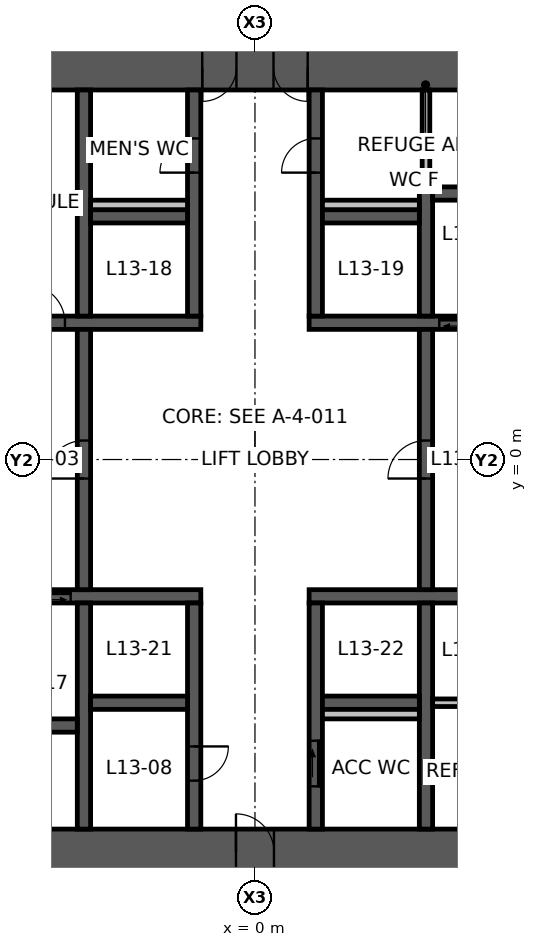
"""IFC4 building model, lengths in metres.
Left out: names, types, materials, properties, quantities, classifications, styles, units other than length and angle.
Written with IfcOpenShell. Run it as: python <this file> out.ifc"""

import sys

from ifc_helpers import new_model, si_unit, direction, frame, frame_2d, origin, place, context, subcontext, project, spatial, polyline, rectangle, outline, extrude, element, fill, save


model = new_model("IFC4")
c1 = context("Model", 3, precision=1e-05, world=origin(), true_north=direction((0.0, 1.0)))
c2 = subcontext(c1, "Body", "Model", "MODEL_VIEW")
j1 = project(units=[si_unit("LENGTHUNIT", "METRE"), si_unit("PLANEANGLEUNIT", "RADIAN")], contexts=[c1])
p1 = place(None, origin())
s1 = spatial("IfcSite", under=j1, at=p1, CompositionType="ELEMENT")
p2 = place(p1, origin())
s2 = spatial("IfcBuilding", under=s1, at=p2, CompositionType="ELEMENT")
p3 = place(p2, frame((0.0, 0.0, 52.0)))
s3 = spatial("IfcBuildingStorey", under=s2, at=p3, CompositionType="ELEMENT", Elevation=52.0)
p4 = place(p3, frame((5.961, 10.325, 0.0), z_axis=(0.0, 0.0, 1.0), x_axis=(-1.0, 0.0, 0.0)))
e1 = element("IfcWall", 1, at=p4, inside=s3, PredefinedType="SHEAR", context=c2, shape_type="SweptSolid", body=[
    extrude(outline(polyline([(-0.346, -0.6), (4.574, -0.6), (5.474, -0.6), (6.449, -0.6), (7.349, -0.6), (12.269, -0.6), (11.576, 0.6), (7.349, 0.6), (6.449, 0.6), (5.474, 0.6), (4.574, 0.6), (0.346, 0.6), (-0.346, -0.6)])), origin(), (0.0, 0.0, 1.0), 5.0),
])
p5 = place(p4, frame((6.449, 0.0, 0.0)))
e2 = element("IfcOpeningElement", 2, at=p5, cuts=e1, PredefinedType="OPENING", context=c2, shape_type="SweptSolid", body=[
    extrude(rectangle(XDim=0.9, YDim=2.1, at=frame_2d((0.45, 1.05))), frame((0.0, 0.61, 0.0), z_axis=(0.0, -1.0, 0.0), x_axis=(1.0, 0.0, 0.0)), (0.0, 0.0, 1.0), 1.22),
])
p6 = place(p4, frame((4.574, 0.0, 0.0)))
e3 = element("IfcOpeningElement", 3, at=p6, cuts=e1, PredefinedType="OPENING", context=c2, shape_type="SweptSolid", body=[
    extrude(rectangle(XDim=0.9, YDim=2.1, at=frame_2d((0.45, 1.05))), frame((0.0, 0.61, 0.0), z_axis=(0.0, -1.0, 0.0), x_axis=(1.0, 0.0, 0.0)), (0.0, 0.0, 1.0), 1.22),
])
p7 = place(p3, frame((-5.961, -10.325, 0.0), z_axis=(0.0, 0.0, 1.0), x_axis=(1.0, 0.0, 0.0)))
e4 = element("IfcWall", 4, at=p7, inside=s3, PredefinedType="SHEAR", context=c2, shape_type="SweptSolid", body=[
    extrude(outline(polyline([(-0.346, -0.6), (5.461, -0.6), (6.461, -0.6), (12.269, -0.6), (11.576, 0.6), (6.461, 0.6), (5.461, 0.6), (0.346, 0.6), (-0.346, -0.6)])), origin(), (0.0, 0.0, 1.0), 5.0),
])
p8 = place(p7, frame((5.461, 0.0, 0.0)))
e5 = element("IfcOpeningElement", 5, at=p8, cuts=e4, PredefinedType="OPENING", context=c2, shape_type="SweptSolid", body=[
    extrude(rectangle(XDim=1.0, YDim=2.1, at=frame_2d((0.5, 1.05))), frame((0.0, 0.61, 0.0), z_axis=(0.0, -1.0, 0.0), x_axis=(1.0, 0.0, 0.0)), (0.0, 0.0, 1.0), 1.22),
])
p9 = place(p3, frame((-9.151, 3.6, 0.0), z_axis=(0.0, 0.0, 1.0), x_axis=(1.0, 0.0, 0.0)))
e6 = element("IfcWall", 6, at=p9, inside=s3, PredefinedType="SHEAR", context=c2, shape_type="SweptSolid", body=[
    extrude(outline(polyline([(-0.101, -0.175), (3.151, -0.175), (4.151, -0.175), (7.726, -0.175), (7.726, 0.175), (4.151, 0.175), (3.151, 0.175), (0.101, 0.175), (-0.101, -0.175)])), origin(), (0.0, 0.0, 1.0), 5.0),
])
p10 = place(p9, frame((3.151, 0.0, 0.0)))
e7 = element("IfcOpeningElement", 7, at=p10, cuts=e6, PredefinedType="OPENING", context=c2, shape_type="SweptSolid", body=[
    extrude(rectangle(XDim=1.0, YDim=2.1, at=frame_2d((0.5, 1.05))), frame((0.0, 0.185, 0.0), z_axis=(0.0, -1.0, 0.0), x_axis=(1.0, 0.0, 0.0)), (0.0, 0.0, 1.0), 0.37),
])
p11 = place(p3, frame((1.425, 3.6, 0.0), z_axis=(0.0, 0.0, 1.0), x_axis=(1.0, 0.0, 0.0)))
e8 = element("IfcWall", 8, at=p11, inside=s3, PredefinedType="SHEAR", context=c2, shape_type="SweptSolid", body=[
    extrude(outline(polyline([(0.0, -0.175), (3.425, -0.175), (4.725, -0.175), (7.827, -0.175), (7.625, 0.175), (4.725, 0.175), (3.425, 0.175), (0.0, 0.175), (0.0, -0.175)])), origin(), (0.0, 0.0, 1.0), 5.0),
])
p12 = place(p11, frame((3.425, 0.0, 0.0)))
e9 = element("IfcOpeningElement", 9, at=p12, cuts=e8, PredefinedType="OPENING", context=c2, shape_type="SweptSolid", body=[
    extrude(rectangle(XDim=1.3, YDim=2.1, at=frame_2d((0.65, 1.05))), frame((0.0, 0.185, 0.0), z_axis=(0.0, -1.0, 0.0), x_axis=(1.0, 0.0, 0.0)), (0.0, 0.0, 1.0), 0.37),
])
p13 = place(p3, frame((-9.151, -3.6, 0.0), z_axis=(0.0, 0.0, 1.0), x_axis=(1.0, 0.0, 0.0)))
e10 = element("IfcWall", 10, at=p13, inside=s3, PredefinedType="SHEAR", context=c2, shape_type="SweptSolid", body=[
    extrude(outline(polyline([(0.101, -0.175), (3.001, -0.175), (4.301, -0.175), (7.726, -0.175), (7.726, 0.175), (4.301, 0.175), (3.001, 0.175), (-0.101, 0.175), (0.101, -0.175)])), origin(), (0.0, 0.0, 1.0), 5.0),
])
p14 = place(p13, frame((3.001, 0.0, 0.0)))
e11 = element("IfcOpeningElement", 11, at=p14, cuts=e10, PredefinedType="OPENING", context=c2, shape_type="SweptSolid", body=[
    extrude(rectangle(XDim=1.3, YDim=2.1, at=frame_2d((0.65, 1.05))), frame((0.0, 0.185, 0.0), z_axis=(0.0, -1.0, 0.0), x_axis=(1.0, 0.0, 0.0)), (0.0, 0.0, 1.0), 0.37),
])
p15 = place(p3, frame((1.425, -3.6, 0.0), z_axis=(0.0, 0.0, 1.0), x_axis=(1.0, 0.0, 0.0)))
e12 = element("IfcWall", 12, at=p15, inside=s3, PredefinedType="SHEAR", context=c2, shape_type="SweptSolid", body=[
    extrude(outline(polyline([(0.0, -0.175), (7.625, -0.175), (7.827, 0.175), (0.0, 0.175), (0.0, -0.175)])), origin(), (0.0, 0.0, 1.0), 5.0),
])
p16 = place(p3, frame((-1.6, 3.775, 0.0), z_axis=(0.0, 0.0, 1.0), x_axis=(0.0, 1.0, 0.0)))
e13 = element("IfcWall", 13, at=p16, inside=s3, PredefinedType="SHEAR", context=c2, shape_type="SweptSolid", body=[
    extrude(rectangle(XDim=5.95, YDim=0.35, at=frame_2d((2.975, 0.0))), origin(), (0.0, 0.0, 1.0), 5.0),
])
p17 = place(p16, frame((3.775, 0.0, 0.0)))
e14 = element("IfcOpeningElement", 14, at=p17, cuts=e13, PredefinedType="OPENING", context=c2, shape_type="SweptSolid", body=[
    extrude(rectangle(XDim=0.9, YDim=2.1, at=frame_2d((0.45, 1.05))), frame((0.0, 0.185, 0.0), z_axis=(0.0, -1.0, 0.0), x_axis=(1.0, 0.0, 0.0)), (0.0, 0.0, 1.0), 0.37),
])
p18 = place(p3, frame((1.6, 3.775, 0.0), z_axis=(0.0, 0.0, 1.0), x_axis=(0.0, 1.0, 0.0)))
e15 = element("IfcWall", 15, at=p18, inside=s3, PredefinedType="SHEAR", context=c2, shape_type="SweptSolid", body=[
    extrude(rectangle(XDim=5.95, YDim=0.35, at=frame_2d((2.975, 0.0))), origin(), (0.0, 0.0, 1.0), 5.0),
])
p19 = place(p18, frame((3.775, 0.0, 0.0)))
e16 = element("IfcOpeningElement", 16, at=p19, cuts=e15, PredefinedType="OPENING", context=c2, shape_type="SweptSolid", body=[
    extrude(rectangle(XDim=0.9, YDim=2.1, at=frame_2d((0.45, 1.05))), frame((0.0, 0.185, 0.0), z_axis=(0.0, -1.0, 0.0), x_axis=(1.0, 0.0, 0.0)), (0.0, 0.0, 1.0), 0.37),
])
p20 = place(p3, frame((-1.6, -3.775, 0.0), z_axis=(0.0, 0.0, 1.0), x_axis=(0.0, -1.0, 0.0)))
e17 = element("IfcWall", 17, at=p20, inside=s3, PredefinedType="SHEAR", context=c2, shape_type="SweptSolid", body=[
    extrude(rectangle(XDim=5.95, YDim=0.35, at=frame_2d((2.975, 0.0))), origin(), (0.0, 0.0, 1.0), 5.0),
])
p21 = place(p20, frame((3.775, 0.0, 0.0)))
e18 = element("IfcOpeningElement", 18, at=p21, cuts=e17, PredefinedType="OPENING", context=c2, shape_type="SweptSolid", body=[
    extrude(rectangle(XDim=0.9, YDim=2.1, at=frame_2d((0.45, 1.05))), frame((0.0, 0.185, 0.0), z_axis=(0.0, -1.0, 0.0), x_axis=(1.0, 0.0, 0.0)), (0.0, 0.0, 1.0), 0.37),
])
p22 = place(p3, frame((1.6, -3.775, 0.0), z_axis=(0.0, 0.0, 1.0), x_axis=(0.0, -1.0, 0.0)))
e19 = element("IfcWall", 19, at=p22, inside=s3, PredefinedType="SHEAR", context=c2, shape_type="SweptSolid", body=[
    extrude(rectangle(XDim=5.95, YDim=0.35, at=frame_2d((2.975, 0.0))), origin(), (0.0, 0.0, 1.0), 5.0),
])
p23 = place(p22, frame((3.625, 0.0, 0.0)))
e20 = element("IfcOpeningElement", 20, at=p23, cuts=e19, PredefinedType="OPENING", context=c2, shape_type="SweptSolid", body=[
    extrude(rectangle(XDim=1.2, YDim=2.1, at=frame_2d((0.6, 1.05))), frame((0.0, 0.185, 0.0), z_axis=(0.0, -1.0, 0.0), x_axis=(1.0, 0.0, 0.0)), (0.0, 0.0, 1.0), 0.37),
])
p24 = place(p3, frame((-4.5, -3.425, 0.0), z_axis=(0.0, 0.0, 1.0), x_axis=(0.0, 1.0, 0.0)))
e21 = element("IfcWall", 21, at=p24, inside=s3, PredefinedType="SHEAR", context=c2, shape_type="SweptSolid", body=[
    extrude(rectangle(XDim=6.85, YDim=0.35, at=frame_2d((3.425, 0.0))), origin(), (0.0, 0.0, 1.0), 5.0),
])
p25 = place(p24, frame((2.925, 0.0, 0.0)))
e22 = element("IfcOpeningElement", 22, at=p25, cuts=e21, PredefinedType="OPENING", context=c2, shape_type="SweptSolid", body=[
    extrude(rectangle(XDim=1.0, YDim=2.1, at=frame_2d((0.5, 1.05))), frame((0.0, 0.185, 0.0), z_axis=(0.0, -1.0, 0.0), x_axis=(1.0, 0.0, 0.0)), (0.0, 0.0, 1.0), 0.37),
])
p26 = place(p3, frame((4.5, -3.425, 0.0), z_axis=(0.0, 0.0, 1.0), x_axis=(0.0, 1.0, 0.0)))
e23 = element("IfcWall", 23, at=p26, inside=s3, PredefinedType="SHEAR", context=c2, shape_type="SweptSolid", body=[
    extrude(rectangle(XDim=6.85, YDim=0.35, at=frame_2d((3.425, 0.0))), origin(), (0.0, 0.0, 1.0), 5.0),
])
p27 = place(p26, frame((2.925, 0.0, 0.0)))
e24 = element("IfcOpeningElement", 24, at=p27, cuts=e23, PredefinedType="OPENING", context=c2, shape_type="SweptSolid", body=[
    extrude(rectangle(XDim=1.0, YDim=2.1, at=frame_2d((0.5, 1.05))), frame((0.0, 0.185, 0.0), z_axis=(0.0, -1.0, 0.0), x_axis=(1.0, 0.0, 0.0)), (0.0, 0.0, 1.0), 0.37),
])
p28 = place(p3, frame((-4.5, 3.775, 0.0), z_axis=(0.0, 0.0, 1.0), x_axis=(0.0, 1.0, 0.0)))
e25 = element("IfcWall", 25, at=p28, inside=s3, PredefinedType="SHEAR", context=c2, shape_type="SweptSolid", body=[
    extrude(rectangle(XDim=5.95, YDim=0.35, at=frame_2d((2.975, 0.0))), origin(), (0.0, 0.0, 1.0), 5.0),
])
p29 = place(p3, frame((4.5, 3.775, 0.0), z_axis=(0.0, 0.0, 1.0), x_axis=(0.0, 1.0, 0.0)))
e26 = element("IfcWall", 26, at=p29, inside=s3, PredefinedType="SHEAR", context=c2, shape_type="SweptSolid", body=[
    extrude(rectangle(XDim=3.4, YDim=0.35, at=frame_2d((1.7, 0.0))), origin(), (0.0, 0.0, 1.0), 5.0),
])
for number, where, z_axis, x_axis in (
    (27, (-4.5, -3.775, 0.0), (0.0, 0.0, 1.0), (0.0, -1.0, 0.0)),
    (28, (4.5, -3.775, 0.0), (0.0, 0.0, 1.0), (0.0, -1.0, 0.0)),
):
    element("IfcWall", number, at=place(p3, frame(where, z_axis=z_axis, x_axis=x_axis)), inside=s3, PredefinedType="SHEAR", context=c2, shape_type="SweptSolid", body=[
        extrude(rectangle(XDim=5.95, YDim=0.35, at=frame_2d((2.975, 0.0))), origin(), (0.0, 0.0, 1.0), 5.0),
    ])
for number, where, z_axis, x_axis in (
    (29, (-4.325, 6.4, 0.0), (0.0, 0.0, 1.0), (1.0, 0.0, 0.0)),
    (30, (1.775, 6.4, 0.0), (0.0, 0.0, 1.0), (1.0, 0.0, 0.0)),
    (31, (-4.325, -6.4, 0.0), (0.0, 0.0, 1.0), (1.0, 0.0, 0.0)),
    (32, (1.775, -6.4, 0.0), (0.0, 0.0, 1.0), (1.0, 0.0, 0.0)),
):
    element("IfcWall", number, at=place(p3, frame(where, z_axis=z_axis, x_axis=x_axis)), inside=s3, PredefinedType="SHEAR", context=c2, shape_type="SweptSolid", body=[
        extrude(rectangle(XDim=2.55, YDim=0.35, at=frame_2d((1.275, 0.0))), origin(), (0.0, 0.0, 1.0), 5.0),
    ])
for number, where, z_axis, x_axis in (
    (33, (-6.925, -7.0, 0.0), (0.0, 0.0, 1.0), (1.0, 0.0, 0.0)),
    (34, (4.675, 7.0, 0.0), (0.0, 0.0, 1.0), (1.0, 0.0, 0.0)),
):
    element("IfcWall", number, at=place(p3, frame(where, z_axis=z_axis, x_axis=x_axis)), inside=s3, PredefinedType="SHEAR", context=c2, shape_type="SweptSolid", body=[
        extrude(rectangle(XDim=2.25, YDim=0.35, at=frame_2d((1.125, 0.0))), origin(), (0.0, 0.0, 1.0), 5.0),
    ])
p30 = place(p3, frame((4.5, 7.175, 0.0), z_axis=(0.0, 0.0, 1.0), x_axis=(0.0, 1.0, 0.0)))
e35 = element("IfcWall", 35, at=p30, inside=s3, PredefinedType="STANDARD", context=c2, shape_type="SweptSolid", body=[
    extrude(rectangle(XDim=2.55, YDim=0.2, at=frame_2d((1.275, 0.0))), origin(), (0.0, 0.0, 1.0), 5.0),
])
p31 = place(p3, frame((4.675, -6.4, 0.0), z_axis=(0.0, 0.0, 1.0), x_axis=(1.0, 0.0, 0.0)))
e36 = element("IfcWall", 36, at=p31, inside=s3, PredefinedType="STANDARD", context=c2, shape_type="SweptSolid", body=[
    extrude(rectangle(XDim=2.425, YDim=0.2, at=frame_2d((1.212, 0.0))), origin(), (0.0, 0.0, 1.0), 5.0),
])
for number, where, z_axis, x_axis in (
    (37, (-4.325, 6.7, 0.0), (0.0, 0.0, 1.0), (1.0, 0.0, 0.0)),
    (38, (1.775, 6.7, 0.0), (0.0, 0.0, 1.0), (1.0, 0.0, 0.0)),
    (39, (1.775, -6.7, 0.0), (0.0, 0.0, 1.0), (1.0, 0.0, 0.0)),
):
    element("IfcWall", number, at=place(p3, frame(where, z_axis=z_axis, x_axis=x_axis)), inside=s3, PredefinedType="PLUMBINGWALL", context=c2, shape_type="SweptSolid", body=[
        extrude(rectangle(XDim=2.55, YDim=0.25, at=frame_2d((1.275, 0.0))), origin(), (0.0, 0.0, 1.0), 5.0),
    ])
p32 = place(p5, origin())
e40 = element("IfcDoor", 40, at=p32, inside=s3, OperationType="SINGLE_SWING_RIGHT", PredefinedType="DOOR", context=c2, shape_type="SweptSolid", body=[
    extrude(rectangle(XDim=0.9, YDim=2.1, at=frame_2d((0.45, 1.05))), frame((0.0, 0.025, 0.0), z_axis=(0.0, -1.0, 0.0), x_axis=(1.0, 0.0, 0.0)), (0.0, 0.0, 1.0), 0.05),
])
fill(e2, e40)
p33 = place(p6, origin())
e41 = element("IfcDoor", 41, at=p33, inside=s3, OperationType="SINGLE_SWING_LEFT", PredefinedType="DOOR", context=c2, shape_type="SweptSolid", body=[
    extrude(rectangle(XDim=0.9, YDim=2.1, at=frame_2d((0.45, 1.05))), frame((0.0, 0.025, 0.0), z_axis=(0.0, -1.0, 0.0), x_axis=(1.0, 0.0, 0.0)), (0.0, 0.0, 1.0), 0.05),
])
fill(e3, e41)
p34 = place(p8, origin())
e42 = element("IfcDoor", 42, at=p34, inside=s3, OperationType="SINGLE_SWING_LEFT", PredefinedType="DOOR", context=c2, shape_type="SweptSolid", body=[
    extrude(rectangle(XDim=1.0, YDim=2.1, at=frame_2d((0.5, 1.05))), frame((0.0, 0.025, 0.0), z_axis=(0.0, -1.0, 0.0), x_axis=(1.0, 0.0, 0.0)), (0.0, 0.0, 1.0), 0.05),
])
fill(e5, e42)
p35 = place(p27, origin())
e43 = element("IfcDoor", 43, at=p35, inside=s3, OperationType="SINGLE_SWING_LEFT", PredefinedType="DOOR", context=c2, shape_type="SweptSolid", body=[
    extrude(rectangle(XDim=1.0, YDim=2.1, at=frame_2d((0.5, 1.05))), frame((0.0, 0.025, 0.0), z_axis=(0.0, -1.0, 0.0), x_axis=(1.0, 0.0, 0.0)), (0.0, 0.0, 1.0), 0.05),
])
fill(e24, e43)
p36 = place(p25, origin())
e44 = element("IfcDoor", 44, at=p36, inside=s3, OperationType="SINGLE_SWING_LEFT", PredefinedType="DOOR", context=c2, shape_type="SweptSolid", body=[
    extrude(rectangle(XDim=1.0, YDim=2.1, at=frame_2d((0.5, 1.05))), frame((0.0, 0.025, 0.0), z_axis=(0.0, -1.0, 0.0), x_axis=(1.0, 0.0, 0.0)), (0.0, 0.0, 1.0), 0.05),
])
fill(e22, e44)
p37 = place(p10, origin())
e45 = element("IfcDoor", 45, at=p37, inside=s3, OperationType="SINGLE_SWING_LEFT", PredefinedType="DOOR", context=c2, shape_type="SweptSolid", body=[
    extrude(rectangle(XDim=1.0, YDim=2.1, at=frame_2d((0.5, 1.05))), frame((0.0, 0.025, 0.0), z_axis=(0.0, -1.0, 0.0), x_axis=(1.0, 0.0, 0.0)), (0.0, 0.0, 1.0), 0.05),
])
fill(e7, e45)
p38 = place(p17, origin())
e46 = element("IfcDoor", 46, at=p38, inside=s3, OperationType="SINGLE_SWING_LEFT", PredefinedType="DOOR", context=c2, shape_type="SweptSolid", body=[
    extrude(rectangle(XDim=0.9, YDim=2.1, at=frame_2d((0.45, 1.05))), frame((0.0, 0.025, 0.0), z_axis=(0.0, -1.0, 0.0), x_axis=(1.0, 0.0, 0.0)), (0.0, 0.0, 1.0), 0.05),
])
fill(e14, e46)
p39 = place(p19, origin())
e47 = element("IfcDoor", 47, at=p39, inside=s3, OperationType="SINGLE_SWING_LEFT", PredefinedType="DOOR", context=c2, shape_type="SweptSolid", body=[
    extrude(rectangle(XDim=0.9, YDim=2.1, at=frame_2d((0.45, 1.05))), frame((0.0, 0.025, 0.0), z_axis=(0.0, -1.0, 0.0), x_axis=(1.0, 0.0, 0.0)), (0.0, 0.0, 1.0), 0.05),
])
fill(e16, e47)
p40 = place(p23, origin())
e48 = element("IfcDoor", 48, at=p40, inside=s3, OperationType="SLIDING_TO_LEFT", PredefinedType="DOOR", context=c2, shape_type="SweptSolid", body=[
    extrude(rectangle(XDim=1.2, YDim=2.1, at=frame_2d((0.6, 1.05))), frame((0.0, 0.025, 0.0), z_axis=(0.0, -1.0, 0.0), x_axis=(1.0, 0.0, 0.0)), (0.0, 0.0, 1.0), 0.05),
])
fill(e20, e48)
p41 = place(p21, origin())
e49 = element("IfcDoor", 49, at=p41, inside=s3, OperationType="SINGLE_SWING_LEFT", PredefinedType="DOOR", context=c2, shape_type="SweptSolid", body=[
    extrude(rectangle(XDim=0.9, YDim=2.1, at=frame_2d((0.45, 1.05))), frame((0.0, 0.025, 0.0), z_axis=(0.0, -1.0, 0.0), x_axis=(1.0, 0.0, 0.0)), (0.0, 0.0, 1.0), 0.05),
])
fill(e18, e49)
p42 = place(p12, origin())
e50 = element("IfcDoor", 50, at=p42, inside=s3, OperationType="DOUBLE_DOOR_SLIDING", PredefinedType="DOOR", context=c2, shape_type="SweptSolid", body=[
    extrude(rectangle(XDim=1.3, YDim=2.1, at=frame_2d((0.65, 1.05))), frame((0.0, 0.025, 0.0), z_axis=(0.0, -1.0, 0.0), x_axis=(1.0, 0.0, 0.0)), (0.0, 0.0, 1.0), 0.05),
])
fill(e9, e50)
p43 = place(p14, origin())
e51 = element("IfcDoor", 51, at=p43, inside=s3, OperationType="DOUBLE_DOOR_SLIDING", PredefinedType="DOOR", context=c2, shape_type="SweptSolid", body=[
    extrude(rectangle(XDim=1.3, YDim=2.1, at=frame_2d((0.65, 1.05))), frame((0.0, 0.025, 0.0), z_axis=(0.0, -1.0, 0.0), x_axis=(1.0, 0.0, 0.0)), (0.0, 0.0, 1.0), 0.05),
])
fill(e11, e51)
save(model, sys.argv[1])
